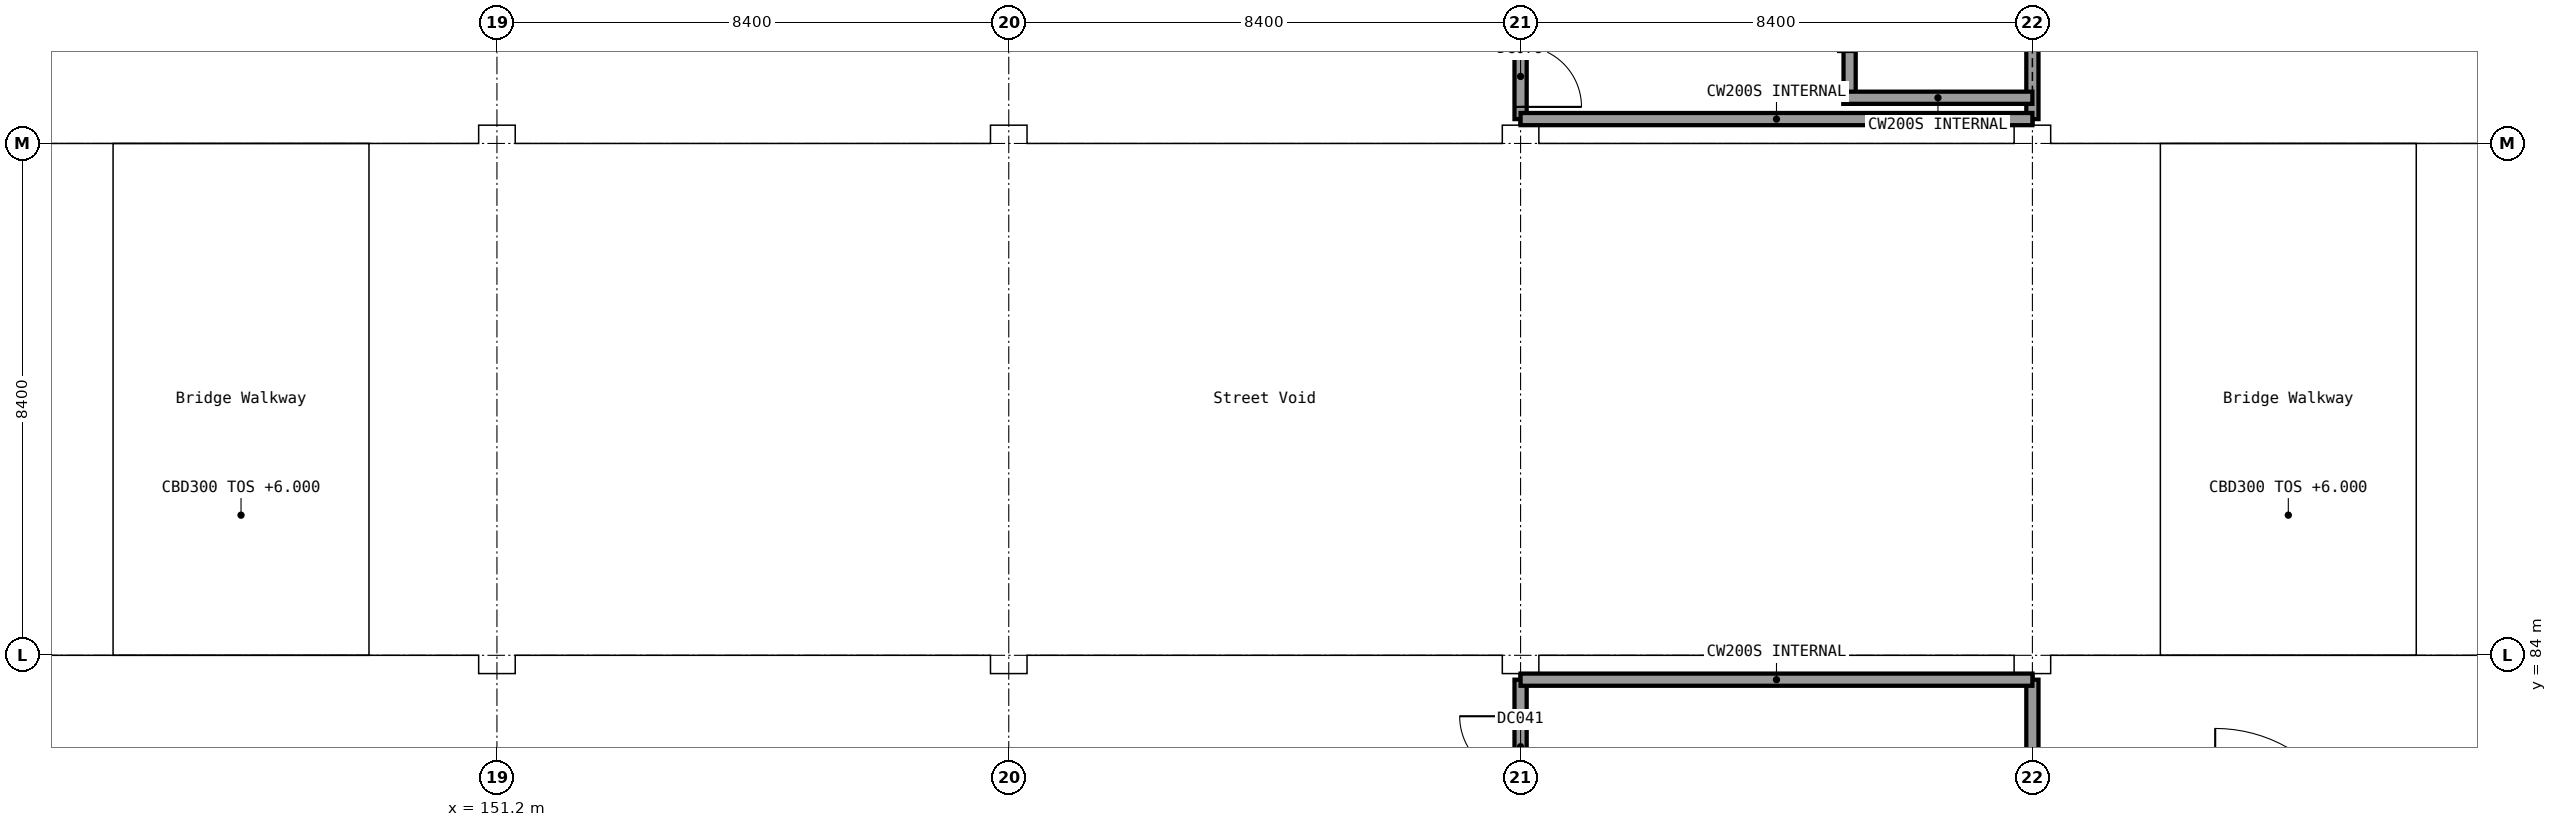
"""IFC4 building model, lengths in metres.
Left out: names, types, materials, properties, quantities, classifications, styles, units other than length and angle.
Written with IfcOpenShell. Run it as: python <this file> out.ifc"""

import sys

from ifc_helpers import new_model, si_unit, direction, frame, frame_2d, origin, place, context, subcontext, project, spatial, rectangle, extrude, element, fill, save


model = new_model("IFC4")
c1 = context("Model", 3, precision=1e-05, world=origin(), true_north=direction((0.0, 1.0)))
c2 = subcontext(c1, "Body", "Model", "MODEL_VIEW")
j1 = project(units=[si_unit("LENGTHUNIT", "METRE"), si_unit("PLANEANGLEUNIT", "RADIAN")], contexts=[c1])
p1 = place(None, origin())
s1 = spatial("IfcSite", under=j1, at=p1, CompositionType="ELEMENT")
p2 = place(p1, origin())
s2 = spatial("IfcBuilding", under=s1, at=p2, CompositionType="ELEMENT")
p3 = place(p2, frame((0.0, 0.0, 6.0)))
s3 = spatial("IfcBuildingStorey", under=s2, at=p3, CompositionType="ELEMENT", Elevation=6.0)
p4 = place(p3, frame((168.0, 75.4, 0.0), z_axis=(0.0, 0.0, 1.0), x_axis=(0.0, 1.0, 0.0)))
e1 = element("IfcWall", 1, at=p4, inside=s3, PredefinedType="SOLIDWALL", context=c2, shape_type="SweptSolid", body=[
    extrude(rectangle(XDim=8.2, YDim=0.2, at=frame_2d((4.1, 0.0))), origin(), (0.0, 0.0, 1.0), 4.2),
])
p5 = place(p4, frame((6.6, 0.0, 0.0)))
e2 = element("IfcOpeningElement", 2, at=p5, cuts=e1, PredefinedType="OPENING", context=c2, shape_type="SweptSolid", body=[
    extrude(rectangle(XDim=1.0, YDim=2.4, at=frame_2d((0.5, 1.2))), frame((0.0, 0.1, 0.0), z_axis=(0.0, -1.0, 0.0), x_axis=(1.0, 0.0, 0.0)), (0.0, 0.0, 1.0), 0.2),
])
p6 = place(p3, frame((176.4, 75.4, 0.0), z_axis=(0.0, 0.0, 1.0), x_axis=(0.0, 1.0, 0.0)))
e3 = element("IfcWall", 3, at=p6, inside=s3, PredefinedType="SOLIDWALL", context=c2, shape_type="SweptSolid", body=[
    extrude(rectangle(XDim=8.2, YDim=0.2, at=frame_2d((4.1, 0.0))), origin(), (0.0, 0.0, 1.0), 4.2),
])
p7 = place(p3, frame((168.0, 83.6, 0.0), z_axis=(0.0, 0.0, 1.0), x_axis=(1.0, 0.0, 0.0)))
e4 = element("IfcWall", 4, at=p7, inside=s3, PredefinedType="SOLIDWALL", context=c2, shape_type="SweptSolid", body=[
    extrude(rectangle(XDim=8.4, YDim=0.2, at=frame_2d((4.2, 0.0))), origin(), (0.0, 0.0, 1.0), 4.2),
])
p8 = place(p3, frame((168.0, 100.5, 0.0), z_axis=(0.0, 0.0, 1.0), x_axis=(0.0, -1.0, 0.0)))
e5 = element("IfcWall", 5, at=p8, inside=s3, PredefinedType="SOLIDWALL", context=c2, shape_type="SweptSolid", body=[
    extrude(rectangle(XDim=7.7, YDim=0.2, at=frame_2d((3.85, 0.0))), origin(), (0.0, 0.0, 1.0), 4.2),
])
p9 = place(p8, frame((6.5, 0.0, 0.0)))
e6 = element("IfcOpeningElement", 6, at=p9, cuts=e5, PredefinedType="OPENING", context=c2, shape_type="SweptSolid", body=[
    extrude(rectangle(XDim=1.0, YDim=2.4, at=frame_2d((0.5, 1.2))), frame((0.0, 0.1, 0.0), z_axis=(0.0, -1.0, 0.0), x_axis=(1.0, 0.0, 0.0)), (0.0, 0.0, 1.0), 0.2),
])
p10 = place(p3, frame((176.4, 100.5, 0.0), z_axis=(0.0, 0.0, 1.0), x_axis=(0.0, -1.0, 0.0)))
e7 = element("IfcWall", 7, at=p10, inside=s3, PredefinedType="SOLIDWALL", context=c2, shape_type="SweptSolid", body=[
    extrude(rectangle(XDim=7.7, YDim=0.2, at=frame_2d((3.85, 0.0))), origin(), (0.0, 0.0, 1.0), 4.2),
])
p11 = place(p3, frame((168.0, 92.8, 0.0), z_axis=(0.0, 0.0, 1.0), x_axis=(1.0, 0.0, 0.0)))
e8 = element("IfcWall", 8, at=p11, inside=s3, PredefinedType="SOLIDWALL", context=c2, shape_type="SweptSolid", body=[
    extrude(rectangle(XDim=8.4, YDim=0.2, at=frame_2d((4.2, 0.0))), origin(), (0.0, 0.0, 1.0), 4.2),
])
p12 = place(p3, frame((173.4, 93.05, 0.0), z_axis=(0.0, 0.0, 1.0), x_axis=(0.0, 1.0, 0.0)))
e9 = element("IfcWall", 9, at=p12, inside=s3, PredefinedType="SOLIDWALL", context=c2, shape_type="SweptSolid", body=[
    extrude(rectangle(XDim=2.6, YDim=0.2, at=frame_2d((1.3, 0.0))), origin(), (0.0, 0.0, 1.0), 4.2),
])
p13 = place(p12, frame((0.85, 0.0, 0.0)))
e10 = element("IfcOpeningElement", 10, at=p13, cuts=e9, PredefinedType="OPENING", context=c2, shape_type="SweptSolid", body=[
    extrude(rectangle(XDim=1.1, YDim=2.1, at=frame_2d((0.55, 1.05))), frame((0.0, 0.1, 0.0), z_axis=(0.0, -1.0, 0.0), x_axis=(1.0, 0.0, 0.0)), (0.0, 0.0, 1.0), 0.2),
])
p14 = place(p3, frame((173.3, 93.15, 0.0), z_axis=(0.0, 0.0, 1.0), x_axis=(1.0, 0.0, 0.0)))
e11 = element("IfcWall", 11, at=p14, inside=s3, PredefinedType="SOLIDWALL", context=c2, shape_type="SweptSolid", body=[
    extrude(rectangle(XDim=3.1, YDim=0.2, at=frame_2d((1.55, 0.0))), origin(), (0.0, 0.0, 1.0), 4.2),
])
p15 = place(p5, origin())
e12 = element("IfcDoor", 12, at=p15, inside=s3, OperationType="SINGLE_SWING_RIGHT", PredefinedType="DOOR", context=c2, shape_type="SweptSolid", body=[
    extrude(rectangle(XDim=1.0, YDim=2.4, at=frame_2d((0.5, 1.2))), frame((0.0, 0.025, 0.0), z_axis=(0.0, -1.0, 0.0), x_axis=(1.0, 0.0, 0.0)), (0.0, 0.0, 1.0), 0.05),
])
fill(e2, e12)
p16 = place(p9, origin())
e13 = element("IfcDoor", 13, at=p16, inside=s3, OperationType="SINGLE_SWING_RIGHT", PredefinedType="DOOR", context=c2, shape_type="SweptSolid", body=[
    extrude(rectangle(XDim=1.0, YDim=2.4, at=frame_2d((0.5, 1.2))), frame((0.0, 0.025, 0.0), z_axis=(0.0, -1.0, 0.0), x_axis=(1.0, 0.0, 0.0)), (0.0, 0.0, 1.0), 0.05),
])
fill(e6, e13)
save(model, sys.argv[1])
